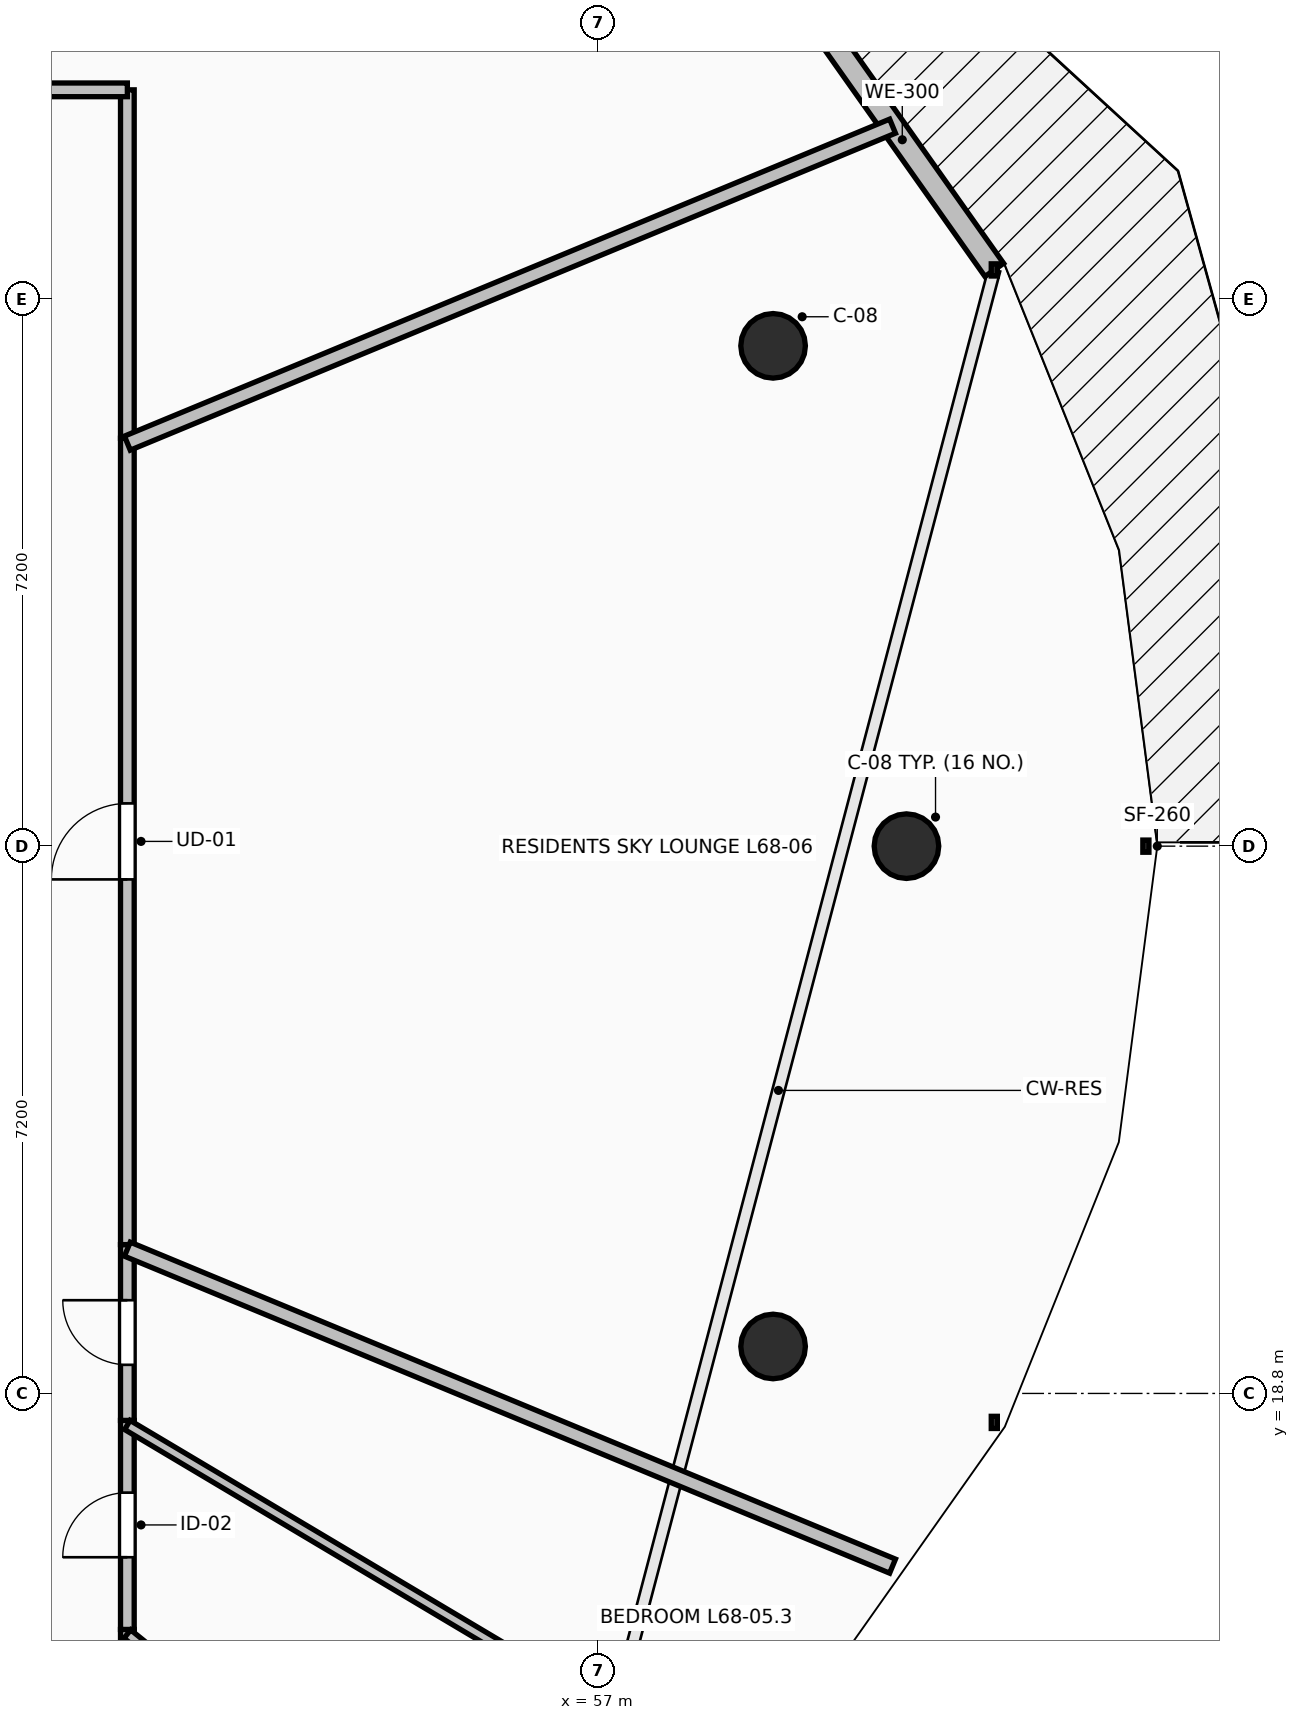
"""IFC4 building model, lengths in metres.
Left out: names, types, materials, properties, quantities, classifications, styles, units other than length and angle.
Written with IfcOpenShell. Run it as: python <this file> out.ifc"""

import sys

from ifc_helpers import new_model, si_unit, direction, frame, frame_2d, origin, origin_2d, place, context, subcontext, project, spatial, rectangle, circle, extrude, element, fill, save


model = new_model("IFC4")
c1 = context("Model", 3, precision=1e-05, world=origin(), true_north=direction((0.0, 1.0)))
c2 = subcontext(c1, "Body", "Model", "MODEL_VIEW")
j1 = project(units=[si_unit("LENGTHUNIT", "METRE"), si_unit("PLANEANGLEUNIT", "RADIAN")], contexts=[c1])
p1 = place(None, origin())
s1 = spatial("IfcSite", under=j1, at=p1, CompositionType="ELEMENT")
p2 = place(p1, origin())
s2 = spatial("IfcBuilding", under=s1, at=p2, CompositionType="ELEMENT")
p3 = place(p2, frame((0.0, 0.0, 252.0)))
s3 = spatial("IfcBuildingStorey", under=s2, at=p3, CompositionType="ELEMENT", Elevation=252.0)
for number, where, z_axis, x_axis in (
    (1, (61.05, 26.0, 0.0), (0.0, 0.0, 1.0), (1.0, 0.0, 0.0)),
    (2, (59.295, 32.582, 0.0), (0.0, 0.0, 1.0), (0.924, 0.383, 0.0)),
    (3, (59.295, 19.418, 0.0), (0.0, 0.0, 1.0), (0.924, -0.383, 0.0)),
):
    element("IfcColumn", number, at=place(p3, frame(where, z_axis=z_axis, x_axis=x_axis)), inside=s3, PredefinedType="COLUMN", context=c2, shape_type="SweptSolid", body=[
        extrude(circle(Radius=0.425, at=origin_2d()), origin(), (0.0, 0.0, 1.0), 3.55),
    ])
p4 = place(p3, frame((62.206, 33.581, 0.0), z_axis=(0.0, 0.0, 1.0), x_axis=(-0.577261247247, 0.816559521668, 0.0)))
e4 = element("IfcWall", 4, at=p4, inside=s3, PredefinedType="STANDARD", context=c2, shape_type="SweptSolid", body=[
    extrude(rectangle(XDim=4.194, YDim=0.3, at=frame_2d((2.097, 0.0))), origin(), (0.0, 0.0, 1.0), 3.29),
])
p5 = place(p3, frame((50.8, 14.05, 0.0), z_axis=(0.0, 0.0, 1.0), x_axis=(0.0, 1.0, 0.0)))
e5 = element("IfcWall", 5, at=p5, inside=s3, PredefinedType="PARTITIONING", context=c2, shape_type="SweptSolid", body=[
    extrude(rectangle(XDim=1.645, YDim=0.18, at=frame_2d((0.823, 0.0))), origin(), (0.0, 0.0, 1.0), 2.482),
])
p6 = place(p3, frame((50.8, 15.695, 0.0), z_axis=(0.0, 0.0, 1.0), x_axis=(0.0, 1.0, 0.0)))
e6 = element("IfcWall", 6, at=p6, inside=s3, PredefinedType="PARTITIONING", context=c2, shape_type="SweptSolid", body=[
    extrude(rectangle(XDim=2.75, YDim=0.18, at=frame_2d((1.375, 0.0))), origin(), (0.0, 0.0, 1.0), 2.482),
])
p7 = place(p6, frame((0.95, 0.0, 0.0)))
e7 = element("IfcOpeningElement", 7, at=p7, cuts=e6, PredefinedType="OPENING", context=c2, shape_type="SweptSolid", body=[
    extrude(rectangle(XDim=0.85, YDim=2.1, at=frame_2d((0.425, 1.05))), frame((0.0, 0.105, 0.0), z_axis=(0.0, -1.0, 0.0), x_axis=(1.0, 0.0, 0.0)), (0.0, 0.0, 1.0), 0.21),
])
p8 = place(p3, frame((50.8, 18.445, 0.0), z_axis=(0.0, 0.0, 1.0), x_axis=(0.0, 1.0, 0.0)))
e8 = element("IfcWall", 8, at=p8, inside=s3, PredefinedType="PARTITIONING", context=c2, shape_type="SweptSolid", body=[
    extrude(rectangle(XDim=2.313, YDim=0.18, at=frame_2d((1.156, 0.0))), origin(), (0.0, 0.0, 1.0), 3.022),
])
p9 = place(p8, frame((0.731, 0.0, 0.0)))
e9 = element("IfcOpeningElement", 9, at=p9, cuts=e8, PredefinedType="OPENING", context=c2, shape_type="SweptSolid", body=[
    extrude(rectangle(XDim=0.85, YDim=2.1, at=frame_2d((0.425, 1.05))), frame((0.0, 0.105, 0.0), z_axis=(0.0, -1.0, 0.0), x_axis=(1.0, 0.0, 0.0)), (0.0, 0.0, 1.0), 0.21),
])
p10 = place(p3, frame((50.8, 20.758, 0.0), z_axis=(0.0, 0.0, 1.0), x_axis=(0.0, 1.0, 0.0)))
e10 = element("IfcWall", 10, at=p10, inside=s3, PredefinedType="PARTITIONING", context=c2, shape_type="SweptSolid", body=[
    extrude(rectangle(XDim=10.609, YDim=0.18, at=frame_2d((5.304, 0.0))), origin(), (0.0, 0.0, 1.0), 2.482),
])
p11 = place(p10, frame((4.804, 0.0, 0.0)))
e11 = element("IfcOpeningElement", 11, at=p11, cuts=e10, PredefinedType="OPENING", context=c2, shape_type="SweptSolid", body=[
    extrude(rectangle(XDim=1.0, YDim=2.15, at=frame_2d((0.5, 1.075))), frame((0.0, 0.105, 0.0), z_axis=(0.0, -1.0, 0.0), x_axis=(1.0, 0.0, 0.0)), (0.0, 0.0, 1.0), 0.21),
])
p12 = place(p3, frame((50.8, 31.367, 0.0), z_axis=(0.0, 0.0, 1.0), x_axis=(0.0, 1.0, 0.0)))
e12 = element("IfcWall", 12, at=p12, inside=s3, PredefinedType="PARTITIONING", context=c2, shape_type="SweptSolid", body=[
    extrude(rectangle(XDim=4.583, YDim=0.18, at=frame_2d((2.292, 0.0))), origin(), (0.0, 0.0, 1.0), 2.482),
])
p13 = place(p3, frame((50.8, 35.95, 0.0), z_axis=(0.0, 0.0, 1.0), x_axis=(-1.0, 0.0, 0.0)))
e13 = element("IfcWall", 13, at=p13, inside=s3, PredefinedType="PARTITIONING", context=c2, shape_type="SweptSolid", body=[
    extrude(rectangle(XDim=8.739, YDim=0.18, at=frame_2d((4.37, 0.0))), origin(), (0.0, 0.0, 1.0), 2.482),
])
p14 = place(p13, frame((3.869, 0.0, 0.0)))
e14 = element("IfcOpeningElement", 14, at=p14, cuts=e13, PredefinedType="OPENING", context=c2, shape_type="SweptSolid", body=[
    extrude(rectangle(XDim=1.0, YDim=2.15, at=frame_2d((0.5, 1.075))), frame((0.0, 0.105, 0.0), z_axis=(0.0, -1.0, 0.0), x_axis=(1.0, 0.0, 0.0)), (0.0, 0.0, 1.0), 0.21),
])
p15 = place(p3, frame((55.828, 11.563, 0.0), z_axis=(0.0, 0.0, 1.0), x_axis=(-0.777103372697, 0.62937298015, 0.0)))
e15 = element("IfcWall", 15, at=p15, inside=s3, PredefinedType="PARTITIONING", context=c2, shape_type="SweptSolid", body=[
    extrude(rectangle(XDim=6.47, YDim=0.14, at=frame_2d((3.235, 0.0))), origin(), (0.0, 0.0, 1.0), 2.482),
])
p16 = place(p3, frame((58.493, 13.808, 0.0), z_axis=(0.0, 0.0, 1.0), x_axis=(-0.859400180079, 0.511303560011, 0.0)))
e16 = element("IfcWall", 16, at=p16, inside=s3, PredefinedType="PARTITIONING", context=c2, shape_type="SweptSolid", body=[
    extrude(rectangle(XDim=8.951, YDim=0.14, at=frame_2d((4.476, 0.0))), origin(), (0.0, 0.0, 1.0), 2.874),
])
p17 = place(p3, frame((60.867, 16.528, 0.0), z_axis=(0.0, 0.0, 1.0), x_axis=(-0.923877013663, 0.382689513347, 0.0)))
e17 = element("IfcWall", 17, at=p17, inside=s3, PredefinedType="PARTITIONING", context=c2, shape_type="SweptSolid", body=[
    extrude(rectangle(XDim=10.896, YDim=0.2, at=frame_2d((5.448, 0.0))), origin(), (0.0, 0.0, 1.0), 2.874),
])
p18 = place(p3, frame((60.867, 35.472, 0.0), z_axis=(0.0, 0.0, 1.0), x_axis=(-0.923877013663, -0.382689513347, 0.0)))
e18 = element("IfcWall", 18, at=p18, inside=s3, PredefinedType="PARTITIONING", context=c2, shape_type="SweptSolid", body=[
    extrude(rectangle(XDim=10.896, YDim=0.2, at=frame_2d((5.448, 0.0))), origin(), (0.0, 0.0, 1.0), 2.482),
])
p19 = place(p11, origin())
e19 = element("IfcDoor", 19, at=p19, inside=s3, OperationType="SINGLE_SWING_LEFT", PredefinedType="DOOR", context=c2, shape_type="SweptSolid", body=[
    extrude(rectangle(XDim=1.0, YDim=2.15, at=frame_2d((0.5, 1.075))), frame((0.0, 0.025, 0.0), z_axis=(0.0, -1.0, 0.0), x_axis=(1.0, 0.0, 0.0)), (0.0, 0.0, 1.0), 0.05),
])
fill(e11, e19)
p20 = place(p7, origin())
e20 = element("IfcDoor", 20, at=p20, inside=s3, OperationType="SINGLE_SWING_LEFT", PredefinedType="DOOR", context=c2, shape_type="SweptSolid", body=[
    extrude(rectangle(XDim=0.85, YDim=2.1, at=frame_2d((0.425, 1.05))), frame((0.0, 0.025, 0.0), z_axis=(0.0, -1.0, 0.0), x_axis=(1.0, 0.0, 0.0)), (0.0, 0.0, 1.0), 0.05),
])
fill(e7, e20)
p21 = place(p9, origin())
e21 = element("IfcDoor", 21, at=p21, inside=s3, OperationType="SINGLE_SWING_RIGHT", PredefinedType="DOOR", context=c2, shape_type="SweptSolid", body=[
    extrude(rectangle(XDim=0.85, YDim=2.1, at=frame_2d((0.425, 1.05))), frame((0.0, 0.025, 0.0), z_axis=(0.0, -1.0, 0.0), x_axis=(1.0, 0.0, 0.0)), (0.0, 0.0, 1.0), 0.05),
])
fill(e9, e21)
save(model, sys.argv[1])
